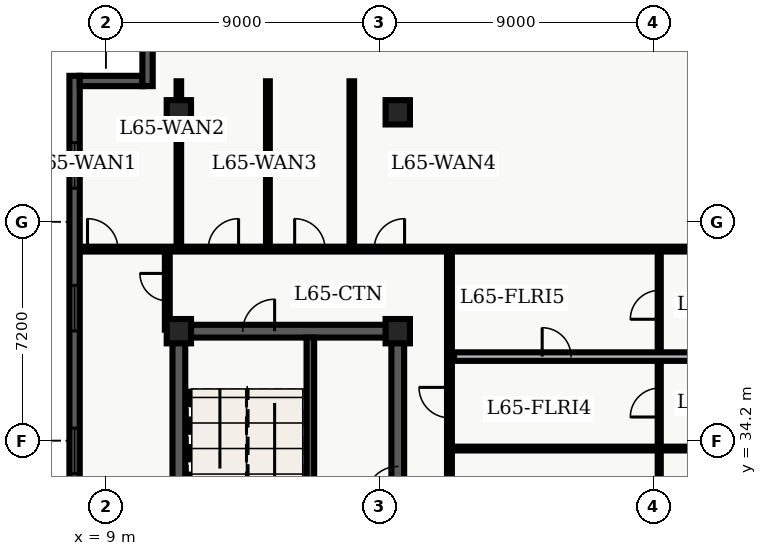
"""IFC4 building model, lengths in metres.
Left out: names, types, materials, properties, quantities, classifications, styles, units other than length and angle.
Written with IfcOpenShell. Run it as: python <this file> out.ifc"""

import sys

from ifc_helpers import new_model, entity, si_unit, converted_unit, direction, frame, origin_with_axes, origin_2d_with_axis, place, context, subcontext, project, spatial, polyline, rectangle, outline, extrude, element, fill, save


model = new_model("IFC4")
c1 = context("Model", 3, precision=1e-05, world=origin_with_axes(), true_north=direction((0.0, 1.0)))
c2 = subcontext(c1, "Body", "Model", "MODEL_VIEW")
j1 = project(units=[si_unit("LENGTHUNIT", "METRE"), converted_unit("PLANEANGLEUNIT", "DEGREE", entity("IfcPlaneAngleMeasure", 0.017), si_unit("PLANEANGLEUNIT", "RADIAN"), dimensions=[0, 0, 0, 0, 0, 0, 0])], contexts=[c1])
p1 = place(None, origin_with_axes())
s1 = spatial("IfcSite", under=j1, at=p1, CompositionType="ELEMENT")
p2 = place(p1, origin_with_axes())
s2 = spatial("IfcBuilding", under=s1, at=p2, CompositionType="ELEMENT")
p3 = place(p2, frame((0.0, 0.0, 264.6), z_axis=(0.0, 0.0, 1.0), x_axis=(1.0, 0.0, 0.0)))
s3 = spatial("IfcBuildingStorey", under=s2, at=p3, CompositionType="ELEMENT", Elevation=264.6)
p4 = place(p3, frame((11.4, 10.8, 0.0), z_axis=(0.0, 0.0, 1.0), x_axis=(0.0, 1.0, 0.0)))
e1 = element("IfcWall", 1, at=p4, inside=s3, PredefinedType="SHEAR", context=c2, shape_type="SweptSolid", body=[
    extrude(outline(polyline([(0.0, -0.21), (27.0, -0.21), (27.0, 0.21), (0.0, 0.21), (0.0, -0.21)])), origin_with_axes(), (0.0, 0.0, 1.0), 3.66),
])
p5 = place(p3, frame((11.4, 37.8, 0.0), z_axis=(0.0, 0.0, 1.0), x_axis=(1.0, 0.0, 0.0)))
e2 = element("IfcWall", 2, at=p5, inside=s3, PredefinedType="SHEAR", context=c2, shape_type="SweptSolid", body=[
    extrude(outline(polyline([(0.0, -0.21), (7.2, -0.21), (7.2, 0.21), (0.0, 0.21), (0.0, -0.21)])), origin_with_axes(), (0.0, 0.0, 1.0), 3.66),
])
p6 = place(p5, frame((2.625, 0.0, 0.0), z_axis=(0.0, 0.0, 1.0), x_axis=(1.0, 0.0, 0.0)))
e3 = element("IfcOpeningElement", 3, at=p6, cuts=e2, PredefinedType="OPENING", context=c2, shape_type="SweptSolid", body=[
    extrude(rectangle(XDim=1.05, YDim=0.44, at=origin_2d_with_axis()), origin_with_axes(), (0.0, 0.0, 1.0), 2.15),
])
p7 = place(p3, frame((18.6, 24.3, 0.0), z_axis=(0.0, 0.0, 1.0), x_axis=(0.0, 1.0, 0.0)))
e4 = element("IfcWall", 4, at=p7, inside=s3, PredefinedType="SHEAR", context=c2, shape_type="SweptSolid", body=[
    extrude(outline(polyline([(0.0, -0.21), (13.5, -0.21), (13.5, 0.21), (0.0, 0.21), (0.0, -0.21)])), origin_with_axes(), (0.0, 0.0, 1.0), 3.66),
])
p8 = place(p7, frame((8.525, 0.0, 0.0), z_axis=(0.0, 0.0, 1.0), x_axis=(1.0, 0.0, 0.0)))
e5 = element("IfcOpeningElement", 5, at=p8, cuts=e4, PredefinedType="OPENING", context=c2, shape_type="SweptSolid", body=[
    extrude(rectangle(XDim=1.05, YDim=0.44, at=origin_2d_with_axis()), origin_with_axes(), (0.0, 0.0, 1.0), 2.15),
])
p9 = place(p3, frame((15.725, 28.9, 0.0), z_axis=(0.0, 0.0, 1.0), x_axis=(0.0, 1.0, 0.0)))
e6 = element("IfcWall", 6, at=p9, inside=s3, PredefinedType="SHEAR", context=c2, shape_type="SweptSolid", body=[
    extrude(outline(polyline([(0.0, -0.125), (8.69, -0.125), (8.69, 0.125), (0.0, 0.125), (0.0, -0.125)])), origin_with_axes(), (0.0, 0.0, 1.0), 3.66),
])
for number, where, z_axis, x_axis in (
    (7, (11.4, 37.8, 0.0), (0.0, 0.0, 1.0), (1.0, 0.0, 0.0)),
    (8, (11.4, 45.0, 0.0), (0.0, 0.0, 1.0), (1.0, 0.0, 0.0)),
    (9, (18.6, 37.8, 0.0), (0.0, 0.0, 1.0), (1.0, 0.0, 0.0)),
    (10, (18.6, 45.0, 0.0), (0.0, 0.0, 1.0), (1.0, 0.0, 0.0)),
):
    element("IfcColumn", number, at=place(p3, frame(where, z_axis=z_axis, x_axis=x_axis)), inside=s3, PredefinedType="COLUMN", context=c2, shape_type="SweptSolid", body=[
        extrude(rectangle(XDim=0.8, YDim=0.8, at=origin_2d_with_axis()), origin_with_axes(), (0.0, 0.0, 1.0), 3.9),
    ])
p10 = place(p3, frame((8.135, 40.5, 0.0), z_axis=(0.0, 0.0, 1.0), x_axis=(1.0, 0.0, 0.0)))
e11 = element("IfcWall", 11, at=p10, inside=s3, PredefinedType="PARTITIONING", context=c2, shape_type="SweptSolid", body=[
    extrude(outline(polyline([(0.0, -0.08), (23.93, -0.08), (23.93, 0.08), (0.0, 0.08), (0.0, -0.08)])), origin_with_axes(), (0.0, 0.0, 1.0), 2.7),
])
p11 = place(p10, frame((0.76, 0.0, 0.0), z_axis=(0.0, 0.0, 1.0), x_axis=(1.0, 0.0, 0.0)))
e12 = element("IfcOpeningElement", 12, at=p11, cuts=e11, PredefinedType="OPENING", context=c2, shape_type="SweptSolid", body=[
    extrude(rectangle(XDim=1.0, YDim=0.18, at=origin_2d_with_axis()), origin_with_axes(), (0.0, 0.0, 1.0), 2.15),
])
p12 = place(p10, frame((4.729, 0.0, 0.0), z_axis=(0.0, 0.0, 1.0), x_axis=(1.0, 0.0, 0.0)))
e13 = element("IfcOpeningElement", 13, at=p12, cuts=e11, PredefinedType="OPENING", context=c2, shape_type="SweptSolid", body=[
    extrude(rectangle(XDim=1.0, YDim=0.18, at=origin_2d_with_axis()), origin_with_axes(), (0.0, 0.0, 1.0), 2.15),
])
p13 = place(p10, frame((7.574, 0.0, 0.0), z_axis=(0.0, 0.0, 1.0), x_axis=(1.0, 0.0, 0.0)))
e14 = element("IfcOpeningElement", 14, at=p13, cuts=e11, PredefinedType="OPENING", context=c2, shape_type="SweptSolid", body=[
    extrude(rectangle(XDim=1.0, YDim=0.18, at=origin_2d_with_axis()), origin_with_axes(), (0.0, 0.0, 1.0), 2.15),
])
p14 = place(p10, frame((10.189, 0.0, 0.0), z_axis=(0.0, 0.0, 1.0), x_axis=(1.0, 0.0, 0.0)))
e15 = element("IfcOpeningElement", 15, at=p14, cuts=e11, PredefinedType="OPENING", context=c2, shape_type="SweptSolid", body=[
    extrude(rectangle(XDim=1.0, YDim=0.18, at=origin_2d_with_axis()), origin_with_axes(), (0.0, 0.0, 1.0), 2.15),
])
p15 = place(p3, frame((20.3, 7.8, 0.0), z_axis=(0.0, 0.0, 1.0), x_axis=(0.0, 1.0, 0.0)))
e16 = element("IfcWall", 16, at=p15, inside=s3, PredefinedType="PARTITIONING", context=c2, shape_type="SweptSolid", body=[
    extrude(outline(polyline([(0.0, -0.08), (32.7, -0.08), (32.7, 0.08), (0.0, 0.08), (0.0, -0.08)])), origin_with_axes(), (0.0, 0.0, 1.0), 2.7),
])
p16 = place(p15, frame((14.2, 0.0, 0.0), z_axis=(0.0, 0.0, 1.0), x_axis=(1.0, 0.0, 0.0)))
e17 = element("IfcOpeningElement", 17, at=p16, cuts=e16, PredefinedType="OPENING", context=c2, shape_type="SweptSolid", body=[
    extrude(rectangle(XDim=1.0, YDim=0.18, at=origin_2d_with_axis()), origin_with_axes(), (0.0, 0.0, 1.0), 2.15),
])
p17 = place(p15, frame((18.779, 0.0, 0.0), z_axis=(0.0, 0.0, 1.0), x_axis=(1.0, 0.0, 0.0)))
e18 = element("IfcOpeningElement", 18, at=p17, cuts=e16, PredefinedType="OPENING", context=c2, shape_type="SweptSolid", body=[
    extrude(rectangle(XDim=1.0, YDim=0.18, at=origin_2d_with_axis()), origin_with_axes(), (0.0, 0.0, 1.0), 2.15),
])
p18 = place(p15, frame((23.784, 0.0, 0.0), z_axis=(0.0, 0.0, 1.0), x_axis=(1.0, 0.0, 0.0)))
e19 = element("IfcOpeningElement", 19, at=p18, cuts=e16, PredefinedType="OPENING", context=c2, shape_type="SweptSolid", body=[
    extrude(rectangle(XDim=1.0, YDim=0.18, at=origin_2d_with_axis()), origin_with_axes(), (0.0, 0.0, 1.0), 2.15),
])
p19 = place(p15, frame((27.651, 0.0, 0.0), z_axis=(0.0, 0.0, 1.0), x_axis=(1.0, 0.0, 0.0)))
e20 = element("IfcOpeningElement", 20, at=p19, cuts=e16, PredefinedType="OPENING", context=c2, shape_type="SweptSolid", body=[
    extrude(rectangle(XDim=1.0, YDim=0.18, at=origin_2d_with_axis()), origin_with_axes(), (0.0, 0.0, 1.0), 2.15),
])
p20 = place(p15, frame((5.475, 0.0, 0.0), z_axis=(0.0, 0.0, 1.0), x_axis=(1.0, 0.0, 0.0)))
e21 = element("IfcOpeningElement", 21, at=p20, cuts=e16, PredefinedType="OPENING", context=c2, shape_type="SweptSolid", body=[
    extrude(rectangle(XDim=1.05, YDim=0.18, at=origin_2d_with_axis()), origin_with_axes(), (0.0, 0.0, 1.0), 2.15),
])
p21 = place(p3, frame((11.02, 37.85, 0.0), z_axis=(0.0, 0.0, 1.0), x_axis=(0.0, 1.0, 0.0)))
e22 = element("IfcWall", 22, at=p21, inside=s3, PredefinedType="PARTITIONING", context=c2, shape_type="SweptSolid", body=[
    extrude(outline(polyline([(0.0, -0.08), (2.65, -0.08), (2.65, 0.08), (0.0, 0.08), (0.0, -0.08)])), origin_with_axes(), (0.0, 0.0, 1.0), 2.7),
])
p22 = place(p21, frame((1.4, 0.0, 0.0), z_axis=(0.0, 0.0, 1.0), x_axis=(1.0, 0.0, 0.0)))
e23 = element("IfcOpeningElement", 23, at=p22, cuts=e22, PredefinedType="OPENING", context=c2, shape_type="SweptSolid", body=[
    extrude(rectangle(XDim=0.9, YDim=0.18, at=origin_2d_with_axis()), origin_with_axes(), (0.0, 0.0, 1.0), 2.15),
])
p23 = place(p3, frame((11.4, 40.6, 0.0), z_axis=(0.0, 0.0, 1.0), x_axis=(0.0, 1.0, 0.0)))
e24 = element("IfcWall", 24, at=p23, inside=s3, PredefinedType="PARTITIONING", context=c2, shape_type="SweptSolid", body=[
    extrude(outline(polyline([(0.0, -0.075), (5.42, -0.075), (5.42, 0.075), (0.0, 0.075), (0.0, -0.075)])), origin_with_axes(), (0.0, 0.0, 1.0), 2.7),
])
p24 = place(p3, frame((14.329, 40.6, 0.0), z_axis=(0.0, 0.0, 1.0), x_axis=(0.0, 1.0, 0.0)))
e25 = element("IfcWall", 25, at=p24, inside=s3, PredefinedType="PARTITIONING", context=c2, shape_type="SweptSolid", body=[
    extrude(outline(polyline([(0.0, -0.062), (5.42, -0.062), (5.42, 0.062), (0.0, 0.062), (0.0, -0.062)])), origin_with_axes(), (0.0, 0.0, 1.0), 2.7),
])
p25 = place(p3, frame((17.088, 40.6, 0.0), z_axis=(0.0, 0.0, 1.0), x_axis=(0.0, 1.0, 0.0)))
e26 = element("IfcWall", 26, at=p25, inside=s3, PredefinedType="PARTITIONING", context=c2, shape_type="SweptSolid", body=[
    extrude(outline(polyline([(0.0, -0.075), (5.42, -0.075), (5.42, 0.075), (0.0, 0.075), (0.0, -0.075)])), origin_with_axes(), (0.0, 0.0, 1.0), 2.7),
])
p26 = place(p3, frame((27.2, 21.4, 0.0), z_axis=(0.0, 0.0, 1.0), x_axis=(0.0, 1.0, 0.0)))
e27 = element("IfcWall", 27, at=p26, inside=s3, PredefinedType="PARTITIONING", context=c2, shape_type="SweptSolid", body=[
    extrude(outline(polyline([(0.0, -0.05), (18.9, -0.05), (18.9, 0.05), (0.0, 0.05), (0.0, -0.05)])), origin_with_axes(), (0.0, 0.0, 1.0), 2.7),
])
p27 = place(p26, frame((1.79, 0.0, 0.0), z_axis=(0.0, 0.0, 1.0), x_axis=(1.0, 0.0, 0.0)))
e28 = element("IfcOpeningElement", 28, at=p27, cuts=e27, PredefinedType="OPENING", context=c2, shape_type="SweptSolid", body=[
    extrude(rectangle(XDim=0.95, YDim=0.12, at=origin_2d_with_axis()), origin_with_axes(), (0.0, 0.0, 1.0), 2.15),
])
p28 = place(p26, frame((5.739, 0.0, 0.0), z_axis=(0.0, 0.0, 1.0), x_axis=(1.0, 0.0, 0.0)))
e29 = element("IfcOpeningElement", 29, at=p28, cuts=e27, PredefinedType="OPENING", context=c2, shape_type="SweptSolid", body=[
    extrude(rectangle(XDim=0.95, YDim=0.12, at=origin_2d_with_axis()), origin_with_axes(), (0.0, 0.0, 1.0), 2.15),
])
p29 = place(p26, frame((10.184, 0.0, 0.0), z_axis=(0.0, 0.0, 1.0), x_axis=(1.0, 0.0, 0.0)))
e30 = element("IfcOpeningElement", 30, at=p29, cuts=e27, PredefinedType="OPENING", context=c2, shape_type="SweptSolid", body=[
    extrude(rectangle(XDim=0.95, YDim=0.12, at=origin_2d_with_axis()), origin_with_axes(), (0.0, 0.0, 1.0), 2.15),
])
p30 = place(p26, frame((14.052, 0.0, 0.0), z_axis=(0.0, 0.0, 1.0), x_axis=(1.0, 0.0, 0.0)))
e31 = element("IfcOpeningElement", 31, at=p30, cuts=e27, PredefinedType="OPENING", context=c2, shape_type="SweptSolid", body=[
    extrude(rectangle(XDim=0.95, YDim=0.12, at=origin_2d_with_axis()), origin_with_axes(), (0.0, 0.0, 1.0), 2.15),
])
p31 = place(p26, frame((17.267, 0.0, 0.0), z_axis=(0.0, 0.0, 1.0), x_axis=(1.0, 0.0, 0.0)))
e32 = element("IfcOpeningElement", 32, at=p31, cuts=e27, PredefinedType="OPENING", context=c2, shape_type="SweptSolid", body=[
    extrude(rectangle(XDim=0.95, YDim=0.12, at=origin_2d_with_axis()), origin_with_axes(), (0.0, 0.0, 1.0), 2.15),
])
p32 = place(p3, frame((20.45, 33.939, 0.0), z_axis=(0.0, 0.0, 1.0), x_axis=(1.0, 0.0, 0.0)))
e33 = element("IfcWall", 33, at=p32, inside=s3, PredefinedType="PARTITIONING", context=c2, shape_type="SweptSolid", body=[
    extrude(outline(polyline([(0.0, -0.062), (11.615, -0.062), (11.615, 0.062), (0.0, 0.062), (0.0, -0.062)])), origin_with_axes(), (0.0, 0.0, 1.0), 2.7),
])
p33 = place(p3, frame((20.45, 36.964, 0.0), z_axis=(0.0, 0.0, 1.0), x_axis=(1.0, 0.0, 0.0)))
e34 = element("IfcWall", 34, at=p33, inside=s3, PredefinedType="PARTITIONING", context=c2, shape_type="SweptSolid", body=[
    extrude(outline(polyline([(0.0, -0.14), (11.615, -0.14), (11.615, 0.14), (0.0, 0.14), (0.0, -0.14)])), origin_with_axes(), (0.0, 0.0, 1.0), 2.7),
])
p34 = place(p33, frame((3.375, 0.0, 0.0), z_axis=(0.0, 0.0, 1.0), x_axis=(1.0, 0.0, 0.0)))
e35 = element("IfcOpeningElement", 35, at=p34, cuts=e34, PredefinedType="OPENING", context=c2, shape_type="SweptSolid", body=[
    extrude(rectangle(XDim=0.95, YDim=0.3, at=origin_2d_with_axis()), origin_with_axes(), (0.0, 0.0, 1.0), 2.15),
])
p35 = place(p3, frame((7.97, 2.74, 0.0), z_axis=(0.0, 0.0, 1.0), x_axis=(0.0, 1.0, 0.0)))
e36 = element("IfcWall", 36, at=p35, inside=s3, PredefinedType="SOLIDWALL", context=c2, shape_type="SweptSolid", body=[
    extrude(outline(polyline([(0.0, -0.17), (43.46, -0.17), (43.46, 0.17), (0.0, 0.17), (0.0, -0.17)])), origin_with_axes(), (0.0, 0.0, 1.0), 3.66),
])
p36 = place(p35, frame((2.948, 0.0, 0.45), z_axis=(0.0, 0.0, 1.0), x_axis=(1.0, 0.0, 0.0)))
e37 = element("IfcOpeningElement", 37, at=p36, cuts=e36, PredefinedType="OPENING", context=c2, shape_type="SweptSolid", body=[
    extrude(rectangle(XDim=1.5, YDim=0.36, at=origin_2d_with_axis()), origin_with_axes(), (0.0, 0.0, 1.0), 2.1),
])
p37 = place(p35, frame((7.643, 0.0, 0.45), z_axis=(0.0, 0.0, 1.0), x_axis=(1.0, 0.0, 0.0)))
e38 = element("IfcOpeningElement", 38, at=p37, cuts=e36, PredefinedType="OPENING", context=c2, shape_type="SweptSolid", body=[
    extrude(rectangle(XDim=1.5, YDim=0.36, at=origin_2d_with_axis()), origin_with_axes(), (0.0, 0.0, 1.0), 2.1),
])
p38 = place(p35, frame((12.339, 0.0, 0.45), z_axis=(0.0, 0.0, 1.0), x_axis=(1.0, 0.0, 0.0)))
e39 = element("IfcOpeningElement", 39, at=p38, cuts=e36, PredefinedType="OPENING", context=c2, shape_type="SweptSolid", body=[
    extrude(rectangle(XDim=1.5, YDim=0.36, at=origin_2d_with_axis()), origin_with_axes(), (0.0, 0.0, 1.0), 2.1),
])
p39 = place(p35, frame((17.034, 0.0, 0.45), z_axis=(0.0, 0.0, 1.0), x_axis=(1.0, 0.0, 0.0)))
e40 = element("IfcOpeningElement", 40, at=p39, cuts=e36, PredefinedType="OPENING", context=c2, shape_type="SweptSolid", body=[
    extrude(rectangle(XDim=1.5, YDim=0.36, at=origin_2d_with_axis()), origin_with_axes(), (0.0, 0.0, 1.0), 2.1),
])
p40 = place(p35, frame((22.58, 0.0, 0.45), z_axis=(0.0, 0.0, 1.0), x_axis=(1.0, 0.0, 0.0)))
e41 = element("IfcOpeningElement", 41, at=p40, cuts=e36, PredefinedType="OPENING", context=c2, shape_type="SweptSolid", body=[
    extrude(rectangle(XDim=1.5, YDim=0.36, at=origin_2d_with_axis()), origin_with_axes(), (0.0, 0.0, 1.0), 2.1),
])
p41 = place(p35, frame((26.426, 0.0, 0.45), z_axis=(0.0, 0.0, 1.0), x_axis=(1.0, 0.0, 0.0)))
e42 = element("IfcOpeningElement", 42, at=p41, cuts=e36, PredefinedType="OPENING", context=c2, shape_type="SweptSolid", body=[
    extrude(rectangle(XDim=1.5, YDim=0.36, at=origin_2d_with_axis()), origin_with_axes(), (0.0, 0.0, 1.0), 2.1),
])
p42 = place(p35, frame((31.121, 0.0, 0.45), z_axis=(0.0, 0.0, 1.0), x_axis=(1.0, 0.0, 0.0)))
e43 = element("IfcOpeningElement", 43, at=p42, cuts=e36, PredefinedType="OPENING", context=c2, shape_type="SweptSolid", body=[
    extrude(rectangle(XDim=1.5, YDim=0.36, at=origin_2d_with_axis()), origin_with_axes(), (0.0, 0.0, 1.0), 2.1),
])
p43 = place(p35, frame((35.817, 0.0, 0.45), z_axis=(0.0, 0.0, 1.0), x_axis=(1.0, 0.0, 0.0)))
e44 = element("IfcOpeningElement", 44, at=p43, cuts=e36, PredefinedType="OPENING", context=c2, shape_type="SweptSolid", body=[
    extrude(rectangle(XDim=1.5, YDim=0.36, at=origin_2d_with_axis()), origin_with_axes(), (0.0, 0.0, 1.0), 2.1),
])
p44 = place(p35, frame((40.512, 0.0, 0.45), z_axis=(0.0, 0.0, 1.0), x_axis=(1.0, 0.0, 0.0)))
e45 = element("IfcOpeningElement", 45, at=p44, cuts=e36, PredefinedType="OPENING", context=c2, shape_type="SweptSolid", body=[
    extrude(rectangle(XDim=1.5, YDim=0.36, at=origin_2d_with_axis()), origin_with_axes(), (0.0, 0.0, 1.0), 2.1),
])
p45 = place(p3, frame((8.14, 46.03, 0.0), z_axis=(0.0, 0.0, 1.0), x_axis=(1.0, 0.0, 0.0)))
e46 = element("IfcWall", 46, at=p45, inside=s3, PredefinedType="SOLIDWALL", context=c2, shape_type="SweptSolid", body=[
    extrude(outline(polyline([(0.0, -0.17), (2.06, -0.17), (2.06, 0.17), (0.0, 0.17), (0.0, -0.17)])), origin_with_axes(), (0.0, 0.0, 1.0), 3.66),
])
p46 = place(p3, frame((10.37, 45.86, 0.0), z_axis=(0.0, 0.0, 1.0), x_axis=(0.0, 1.0, 0.0)))
e47 = element("IfcWall", 47, at=p46, inside=s3, PredefinedType="SOLIDWALL", context=c2, shape_type="SweptSolid", body=[
    extrude(outline(polyline([(0.0, -0.17), (2.74, -0.17), (2.74, 0.17), (0.0, 0.17), (0.0, -0.17)])), origin_with_axes(), (0.0, 0.0, 1.0), 3.66),
])
p47 = place(p5, frame((2.625, 0.0, 0.0), z_axis=(0.0, 0.0, 1.0), x_axis=(1.0, 0.0, 0.0)))
e48 = element("IfcDoor", 48, at=p47, inside=s3, OperationType="SINGLE_SWING_RIGHT", PredefinedType="DOOR", context=c2, shape_type="SweptSolid", body=[
    extrude(rectangle(XDim=1.05, YDim=0.09, at=origin_2d_with_axis()), origin_with_axes(), (0.0, 0.0, 1.0), 2.15),
])
fill(e3, e48)
p48 = place(p7, frame((8.525, 0.0, 0.0), z_axis=(0.0, 0.0, 1.0), x_axis=(1.0, 0.0, 0.0)))
e49 = element("IfcDoor", 49, at=p48, inside=s3, OperationType="SINGLE_SWING_LEFT", PredefinedType="DOOR", context=c2, shape_type="SweptSolid", body=[
    extrude(rectangle(XDim=1.05, YDim=0.09, at=origin_2d_with_axis()), origin_with_axes(), (0.0, 0.0, 1.0), 2.15),
])
fill(e5, e49)
p49 = place(p21, frame((1.4, 0.0, 0.0), z_axis=(0.0, 0.0, 1.0), x_axis=(1.0, 0.0, 0.0)))
e50 = element("IfcDoor", 50, at=p49, inside=s3, OperationType="SINGLE_SWING_RIGHT", PredefinedType="DOOR", context=c2, shape_type="SweptSolid", body=[
    extrude(rectangle(XDim=0.9, YDim=0.09, at=origin_2d_with_axis()), origin_with_axes(), (0.0, 0.0, 1.0), 2.15),
])
fill(e23, e50)
p50 = place(p10, frame((0.76, 0.0, 0.0), z_axis=(0.0, 0.0, 1.0), x_axis=(1.0, 0.0, 0.0)))
e51 = element("IfcDoor", 51, at=p50, inside=s3, OperationType="SINGLE_SWING_LEFT", PredefinedType="DOOR", context=c2, shape_type="SweptSolid", body=[
    extrude(rectangle(XDim=1.0, YDim=0.09, at=origin_2d_with_axis()), origin_with_axes(), (0.0, 0.0, 1.0), 2.15),
])
fill(e12, e51)
p51 = place(p10, frame((4.729, 0.0, 0.0), z_axis=(0.0, 0.0, 1.0), x_axis=(1.0, 0.0, 0.0)))
e52 = element("IfcDoor", 52, at=p51, inside=s3, OperationType="SINGLE_SWING_RIGHT", PredefinedType="DOOR", context=c2, shape_type="SweptSolid", body=[
    extrude(rectangle(XDim=1.0, YDim=0.09, at=origin_2d_with_axis()), origin_with_axes(), (0.0, 0.0, 1.0), 2.15),
])
fill(e13, e52)
p52 = place(p10, frame((7.574, 0.0, 0.0), z_axis=(0.0, 0.0, 1.0), x_axis=(1.0, 0.0, 0.0)))
e53 = element("IfcDoor", 53, at=p52, inside=s3, OperationType="SINGLE_SWING_LEFT", PredefinedType="DOOR", context=c2, shape_type="SweptSolid", body=[
    extrude(rectangle(XDim=1.0, YDim=0.09, at=origin_2d_with_axis()), origin_with_axes(), (0.0, 0.0, 1.0), 2.15),
])
fill(e14, e53)
p53 = place(p10, frame((10.189, 0.0, 0.0), z_axis=(0.0, 0.0, 1.0), x_axis=(1.0, 0.0, 0.0)))
e54 = element("IfcDoor", 54, at=p53, inside=s3, OperationType="SINGLE_SWING_RIGHT", PredefinedType="DOOR", context=c2, shape_type="SweptSolid", body=[
    extrude(rectangle(XDim=1.0, YDim=0.09, at=origin_2d_with_axis()), origin_with_axes(), (0.0, 0.0, 1.0), 2.15),
])
fill(e15, e54)
p54 = place(p26, frame((14.052, 0.0, 0.0), z_axis=(0.0, 0.0, 1.0), x_axis=(1.0, 0.0, 0.0)))
e55 = element("IfcDoor", 55, at=p54, inside=s3, OperationType="SINGLE_SWING_LEFT", PredefinedType="DOOR", context=c2, shape_type="SweptSolid", body=[
    extrude(rectangle(XDim=0.95, YDim=0.06, at=origin_2d_with_axis()), origin_with_axes(), (0.0, 0.0, 1.0), 2.15),
])
fill(e31, e55)
p55 = place(p15, frame((27.651, 0.0, 0.0), z_axis=(0.0, 0.0, 1.0), x_axis=(1.0, 0.0, 0.0)))
e56 = element("IfcDoor", 56, at=p55, inside=s3, OperationType="SINGLE_SWING_RIGHT", PredefinedType="DOOR", context=c2, shape_type="SweptSolid", body=[
    extrude(rectangle(XDim=1.0, YDim=0.09, at=origin_2d_with_axis()), origin_with_axes(), (0.0, 0.0, 1.0), 2.15),
])
fill(e20, e56)
p56 = place(p26, frame((17.267, 0.0, 0.0), z_axis=(0.0, 0.0, 1.0), x_axis=(1.0, 0.0, 0.0)))
e57 = element("IfcDoor", 57, at=p56, inside=s3, OperationType="SINGLE_SWING_LEFT", PredefinedType="DOOR", context=c2, shape_type="SweptSolid", body=[
    extrude(rectangle(XDim=0.95, YDim=0.06, at=origin_2d_with_axis()), origin_with_axes(), (0.0, 0.0, 1.0), 2.15),
])
fill(e32, e57)
p57 = place(p33, frame((3.375, 0.0, 0.0), z_axis=(0.0, 0.0, 1.0), x_axis=(1.0, 0.0, 0.0)))
e58 = element("IfcDoor", 58, at=p57, inside=s3, OperationType="SINGLE_SWING_LEFT", PredefinedType="DOOR", context=c2, shape_type="SweptSolid", body=[
    extrude(rectangle(XDim=0.95, YDim=0.09, at=origin_2d_with_axis()), origin_with_axes(), (0.0, 0.0, 1.0), 2.15),
])
fill(e35, e58)
p58 = place(p35, frame((31.121, 0.0, 0.45), z_axis=(0.0, 0.0, 1.0), x_axis=(1.0, 0.0, 0.0)))
e59 = element("IfcWindow", 59, at=p58, inside=s3, PredefinedType="WINDOW", context=c2, shape_type="SweptSolid", body=[
    extrude(rectangle(XDim=1.5, YDim=0.09, at=origin_2d_with_axis()), origin_with_axes(), (0.0, 0.0, 1.0), 2.1),
])
fill(e43, e59)
p59 = place(p35, frame((35.817, 0.0, 0.45), z_axis=(0.0, 0.0, 1.0), x_axis=(1.0, 0.0, 0.0)))
e60 = element("IfcWindow", 60, at=p59, inside=s3, PredefinedType="WINDOW", context=c2, shape_type="SweptSolid", body=[
    extrude(rectangle(XDim=1.5, YDim=0.09, at=origin_2d_with_axis()), origin_with_axes(), (0.0, 0.0, 1.0), 2.1),
])
fill(e44, e60)
p60 = place(p35, frame((40.512, 0.0, 0.45), z_axis=(0.0, 0.0, 1.0), x_axis=(1.0, 0.0, 0.0)))
e61 = element("IfcWindow", 61, at=p60, inside=s3, PredefinedType="WINDOW", context=c2, shape_type="SweptSolid", body=[
    extrude(rectangle(XDim=1.5, YDim=0.09, at=origin_2d_with_axis()), origin_with_axes(), (0.0, 0.0, 1.0), 2.1),
])
fill(e45, e61)
save(model, sys.argv[1])
